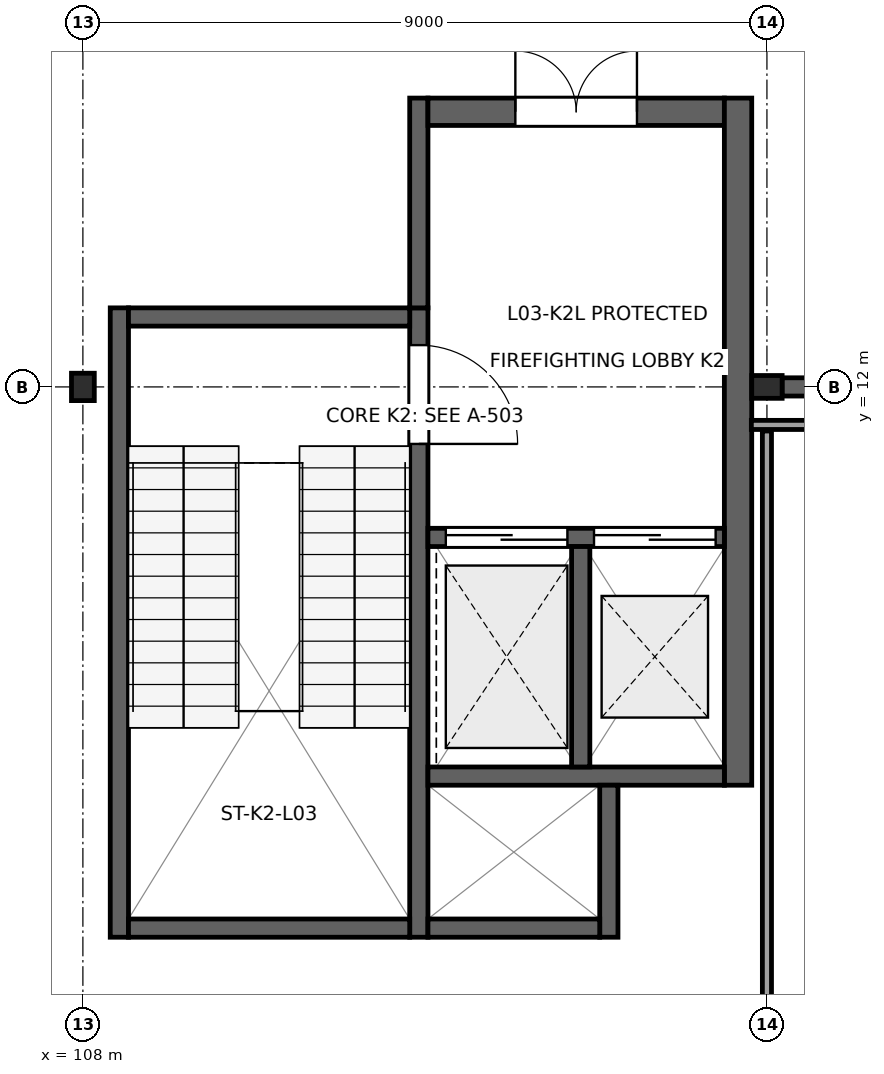
"""IFC4 building model, lengths in metres.
Left out: names, types, materials, properties, quantities, classifications, styles, units other than length and angle.
Written with IfcOpenShell. Run it as: python <this file> out.ifc"""

import sys

from ifc_helpers import new_model, si_unit, direction, frame, frame_2d, origin, origin_2d, place, context, subcontext, project, spatial, rectangle, i_section, extrude, element, fill, save


model = new_model("IFC4")
c1 = context("Model", 3, precision=1e-05, world=origin(), true_north=direction((0.0, 1.0)))
c2 = subcontext(c1, "Body", "Model", "MODEL_VIEW")
j1 = project(units=[si_unit("LENGTHUNIT", "METRE"), si_unit("PLANEANGLEUNIT", "RADIAN")], contexts=[c1])
p1 = place(None, origin())
s1 = spatial("IfcSite", under=j1, at=p1, CompositionType="ELEMENT")
p2 = place(p1, origin())
s2 = spatial("IfcBuilding", under=s1, at=p2, CompositionType="ELEMENT")
p3 = place(p2, frame((0.0, 0.0, 14.4)))
s3 = spatial("IfcBuildingStorey", under=s2, at=p3, CompositionType="ELEMENT", Elevation=14.4)
p4 = place(p3, frame((108.0, 12.0, 0.0), z_axis=(0.0, 0.0, 1.0), x_axis=(1.0, 0.0, 0.0)))
e1 = element("IfcColumn", 1, at=p4, inside=s3, PredefinedType="COLUMN", context=c2, shape_type="SweptSolid", body=[
    extrude(i_section(OverallWidth=0.3, OverallDepth=0.36, WebThickness=0.012, FlangeThickness=0.022, at=origin_2d()), origin(), (0.0, 0.0, 1.0), 4.5),
])
p5 = place(p3, frame((117.0, 12.0, 0.0), z_axis=(0.0, 0.0, 1.0), x_axis=(0.0, 1.0, 0.0)))
e2 = element("IfcColumn", 2, at=p5, inside=s3, PredefinedType="COLUMN", context=c2, shape_type="SweptSolid", body=[
    extrude(i_section(OverallWidth=0.3, OverallDepth=0.4, WebThickness=0.013, FlangeThickness=0.024, at=origin_2d()), origin(), (0.0, 0.0, 1.0), 4.5),
])
p6 = place(p3, frame((108.48, 4.76, 0.0), z_axis=(0.0, 0.0, 1.0), x_axis=(0.0, 1.0, 0.0)))
e3 = element("IfcWall", 3, at=p6, inside=s3, PredefinedType="SHEAR", context=c2, shape_type="SweptSolid", body=[
    extrude(rectangle(XDim=8.28, YDim=0.24, at=frame_2d((4.14, 0.0))), origin(), (0.0, 0.0, 1.0), 4.31),
])
p7 = place(p3, frame((112.42, 4.76, 0.0), z_axis=(0.0, 0.0, 1.0), x_axis=(0.0, 1.0, 0.0)))
e4 = element("IfcWall", 4, at=p7, inside=s3, PredefinedType="SHEAR", context=c2, shape_type="SweptSolid", body=[
    extrude(rectangle(XDim=8.28, YDim=0.24, at=frame_2d((4.14, 0.0))), origin(), (0.0, 0.0, 1.0), 4.31),
])
p8 = place(p7, frame((6.49, 0.0, 0.0)))
e5 = element("IfcOpeningElement", 5, at=p8, cuts=e4, PredefinedType="OPENING", context=c2, shape_type="SweptSolid", body=[
    extrude(rectangle(XDim=1.3, YDim=2.2, at=frame_2d((0.65, 1.1))), frame((0.0, 0.135, 0.0), z_axis=(0.0, -1.0, 0.0), x_axis=(1.0, 0.0, 0.0)), (0.0, 0.0, 1.0), 0.27),
])
for number, where, z_axis, x_axis in (
    (6, (108.6, 4.88, 0.0), (0.0, 0.0, 1.0), (1.0, 0.0, 0.0)),
    (7, (108.6, 12.92, 0.0), (0.0, 0.0, 1.0), (1.0, 0.0, 0.0)),
):
    element("IfcWall", number, at=place(p3, frame(where, z_axis=z_axis, x_axis=x_axis)), inside=s3, PredefinedType="SHEAR", context=c2, shape_type="SweptSolid", body=[
        extrude(rectangle(XDim=3.7, YDim=0.24, at=frame_2d((1.85, 0.0))), origin(), (0.0, 0.0, 1.0), 4.31),
    ])
p9 = place(p3, frame((112.42, 13.04, 0.0), z_axis=(0.0, 0.0, 1.0), x_axis=(0.0, 1.0, 0.0)))
e8 = element("IfcWall", 8, at=p9, inside=s3, PredefinedType="SHEAR", context=c2, shape_type="SweptSolid", body=[
    extrude(rectangle(XDim=2.76, YDim=0.24, at=frame_2d((1.38, 0.0))), origin(), (0.0, 0.0, 1.0), 4.16),
])
p10 = place(p3, frame((112.54, 15.62, 0.0), z_axis=(0.0, 0.0, 1.0), x_axis=(1.0, 0.0, 0.0)))
e9 = element("IfcWall", 9, at=p10, inside=s3, PredefinedType="SHEAR", context=c2, shape_type="SweptSolid", body=[
    extrude(rectangle(XDim=3.9, YDim=0.36, at=frame_2d((1.95, 0.0))), origin(), (0.0, 0.0, 1.0), 4.16),
])
p11 = place(p10, frame((1.15, 0.0, 0.0)))
e10 = element("IfcOpeningElement", 10, at=p11, cuts=e9, PredefinedType="OPENING", context=c2, shape_type="SweptSolid", body=[
    extrude(rectangle(XDim=1.6, YDim=2.25, at=frame_2d((0.8, 1.125))), frame((0.0, 0.195, 0.0), z_axis=(0.0, -1.0, 0.0), x_axis=(1.0, 0.0, 0.0)), (0.0, 0.0, 1.0), 0.39),
])
p12 = place(p3, frame((116.62, 6.76, 0.0), z_axis=(0.0, 0.0, 1.0), x_axis=(0.0, 1.0, 0.0)))
e11 = element("IfcWall", 11, at=p12, inside=s3, PredefinedType="SHEAR", context=c2, shape_type="SweptSolid", body=[
    extrude(rectangle(XDim=9.04, YDim=0.36, at=frame_2d((4.52, 0.0))), origin(), (0.0, 0.0, 1.0), 4.16),
])
p13 = place(p3, frame((112.54, 10.02, 0.0), z_axis=(0.0, 0.0, 1.0), x_axis=(1.0, 0.0, 0.0)))
e12 = element("IfcWall", 12, at=p13, inside=s3, PredefinedType="SHEAR", context=c2, shape_type="SweptSolid", body=[
    extrude(rectangle(XDim=3.9, YDim=0.24, at=frame_2d((1.95, 0.0))), origin(), (0.0, 0.0, 1.0), 4.31),
])
p14 = place(p13, frame((0.235, 0.0, 0.0)))
e13 = element("IfcOpeningElement", 13, at=p14, cuts=e12, PredefinedType="OPENING", context=c2, shape_type="SweptSolid", body=[
    extrude(rectangle(XDim=1.6, YDim=2.3, at=frame_2d((0.8, 1.15))), frame((0.0, 0.135, 0.0), z_axis=(0.0, -1.0, 0.0), x_axis=(1.0, 0.0, 0.0)), (0.0, 0.0, 1.0), 0.27),
])
p15 = place(p13, frame((2.185, 0.0, 0.0)))
e14 = element("IfcOpeningElement", 14, at=p15, cuts=e12, PredefinedType="OPENING", context=c2, shape_type="SweptSolid", body=[
    extrude(rectangle(XDim=1.6, YDim=2.3, at=frame_2d((0.8, 1.15))), frame((0.0, 0.135, 0.0), z_axis=(0.0, -1.0, 0.0), x_axis=(1.0, 0.0, 0.0)), (0.0, 0.0, 1.0), 0.27),
])
p16 = place(p3, frame((112.54, 6.88, 0.0), z_axis=(0.0, 0.0, 1.0), x_axis=(1.0, 0.0, 0.0)))
e15 = element("IfcWall", 15, at=p16, inside=s3, PredefinedType="SHEAR", context=c2, shape_type="SweptSolid", body=[
    extrude(rectangle(XDim=3.9, YDim=0.24, at=frame_2d((1.95, 0.0))), origin(), (0.0, 0.0, 1.0), 4.31),
])
p17 = place(p3, frame((114.55, 7.0, 0.0), z_axis=(0.0, 0.0, 1.0), x_axis=(0.0, 1.0, 0.0)))
e16 = element("IfcWall", 16, at=p17, inside=s3, PredefinedType="SHEAR", context=c2, shape_type="SweptSolid", body=[
    extrude(rectangle(XDim=2.9, YDim=0.24, at=frame_2d((1.45, 0.0))), origin(), (0.0, 0.0, 1.0), 4.31),
])
p18 = place(p3, frame((114.92, 4.76, 0.0), z_axis=(0.0, 0.0, 1.0), x_axis=(0.0, 1.0, 0.0)))
e17 = element("IfcWall", 17, at=p18, inside=s3, PredefinedType="SHEAR", context=c2, shape_type="SweptSolid", body=[
    extrude(rectangle(XDim=2.0, YDim=0.24, at=frame_2d((1.0, 0.0))), origin(), (0.0, 0.0, 1.0), 4.31),
])
p19 = place(p3, frame((112.54, 4.88, 0.0), z_axis=(0.0, 0.0, 1.0), x_axis=(1.0, 0.0, 0.0)))
e18 = element("IfcWall", 18, at=p19, inside=s3, PredefinedType="SHEAR", context=c2, shape_type="SweptSolid", body=[
    extrude(rectangle(XDim=2.26, YDim=0.24, at=frame_2d((1.13, 0.0))), origin(), (0.0, 0.0, 1.0), 4.31),
])
p20 = place(p3, frame((117.198, 12.0, 0.0), z_axis=(0.0, 0.0, 1.0), x_axis=(1.0, 0.0, 0.0)))
e19 = element("IfcWall", 19, at=p20, inside=s3, PredefinedType="SHEAR", context=c2, shape_type="SweptSolid", body=[
    extrude(rectangle(XDim=8.794, YDim=0.24, at=frame_2d((4.397, 0.0))), origin(), (0.0, 0.0, 1.0), 3.575),
])
p21 = place(p3, frame((117.0, 3.655, 0.0), z_axis=(0.0, 0.0, 1.0), x_axis=(0.0, 1.0, 0.0)))
e20 = element("IfcWall", 20, at=p21, inside=s3, PredefinedType="PARTITIONING", context=c2, shape_type="SweptSolid", body=[
    extrude(rectangle(XDim=7.765, YDim=0.12, at=frame_2d((3.882, 0.0))), origin(), (0.0, 0.0, 1.0), 3.575),
])
p22 = place(p3, frame((116.795, 11.5, 0.0), z_axis=(0.0, 0.0, 1.0), x_axis=(1.0, 0.0, 0.0)))
e21 = element("IfcWall", 21, at=p22, inside=s3, PredefinedType="PARTITIONING", context=c2, shape_type="SweptSolid", body=[
    extrude(rectangle(XDim=9.425, YDim=0.12, at=frame_2d((4.712, 0.0))), origin(), (0.0, 0.0, 1.0), 4.14),
])
p23 = place(p8, frame((1.3, 0.0, 0.0), z_axis=(0.0, 0.0, 1.0), x_axis=(-1.0, 0.0, 0.0)))
e22 = element("IfcDoor", 22, at=p23, inside=s3, OperationType="SINGLE_SWING_LEFT", PredefinedType="DOOR", context=c2, shape_type="SweptSolid", body=[
    extrude(rectangle(XDim=1.3, YDim=2.2, at=frame_2d((0.65, 1.1))), frame((0.0, 0.025, 0.0), z_axis=(0.0, -1.0, 0.0), x_axis=(1.0, 0.0, 0.0)), (0.0, 0.0, 1.0), 0.05),
])
fill(e5, e22)
p24 = place(p11, origin())
e23 = element("IfcDoor", 23, at=p24, inside=s3, OperationType="DOUBLE_DOOR_SINGLE_SWING", PredefinedType="DOOR", context=c2, shape_type="SweptSolid", body=[
    extrude(rectangle(XDim=1.6, YDim=2.25, at=frame_2d((0.8, 1.125))), frame((0.0, 0.025, 0.0), z_axis=(0.0, -1.0, 0.0), x_axis=(1.0, 0.0, 0.0)), (0.0, 0.0, 1.0), 0.05),
])
fill(e10, e23)
p25 = place(p14, origin())
e24 = element("IfcDoor", 24, at=p25, inside=s3, OperationType="DOUBLE_DOOR_SLIDING", PredefinedType="DOOR", context=c2, shape_type="SweptSolid", body=[
    extrude(rectangle(XDim=1.6, YDim=2.3, at=frame_2d((0.8, 1.15))), frame((0.0, 0.025, 0.0), z_axis=(0.0, -1.0, 0.0), x_axis=(1.0, 0.0, 0.0)), (0.0, 0.0, 1.0), 0.05),
])
fill(e13, e24)
p26 = place(p15, origin())
e25 = element("IfcDoor", 25, at=p26, inside=s3, OperationType="DOUBLE_DOOR_SLIDING", PredefinedType="DOOR", context=c2, shape_type="SweptSolid", body=[
    extrude(rectangle(XDim=1.6, YDim=2.3, at=frame_2d((0.8, 1.15))), frame((0.0, 0.025, 0.0), z_axis=(0.0, -1.0, 0.0), x_axis=(1.0, 0.0, 0.0)), (0.0, 0.0, 1.0), 0.05),
])
fill(e14, e25)
save(model, sys.argv[1])
